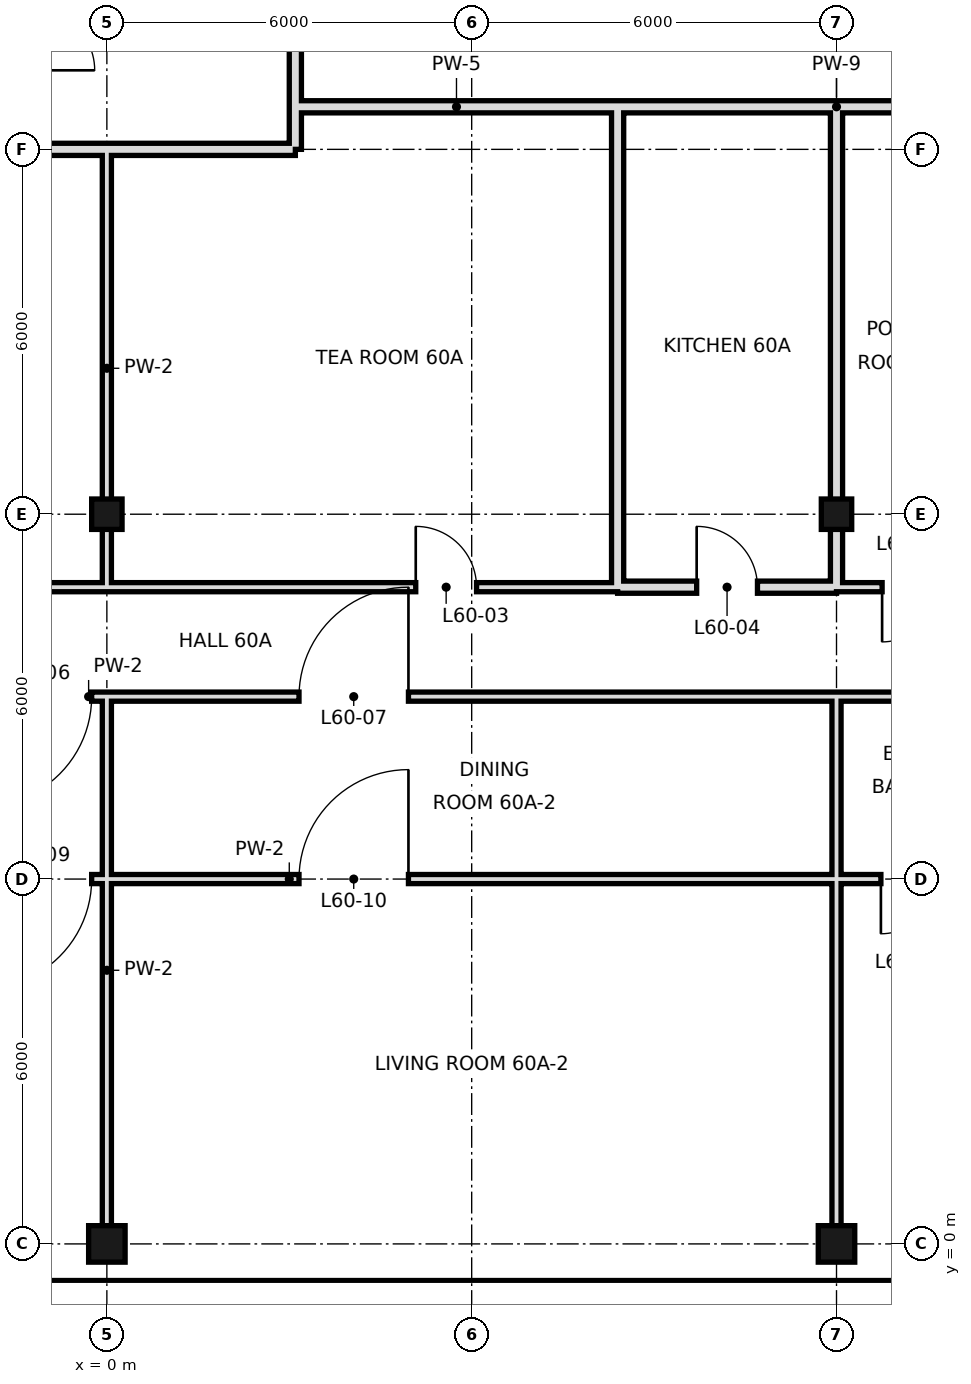
"""IFC4 building model, lengths in metres.
Left out: names, types, materials, properties, quantities, classifications, styles, units other than length and angle.
Written with IfcOpenShell. Run it as: python <this file> out.ifc"""

import sys

from ifc_helpers import new_model, si_unit, direction, frame, frame_2d, origin, origin_with_axes, origin_2d, place, context, subcontext, project, spatial, rectangle, hollow_rectangle, extrude, element, fill, save


model = new_model("IFC4")
c1 = context("Model", 3, precision=1e-05, world=origin(), true_north=direction((0.0, 1.0)))
c2 = subcontext(c1, "Body", "Model", "MODEL_VIEW")
j1 = project(units=[si_unit("LENGTHUNIT", "METRE"), si_unit("PLANEANGLEUNIT", "RADIAN")], contexts=[c1])
p1 = place(None, origin())
s1 = spatial("IfcSite", under=j1, at=p1, CompositionType="ELEMENT")
p2 = place(p1, origin())
s2 = spatial("IfcBuilding", under=s1, at=p2, CompositionType="ELEMENT")
p3 = place(p2, frame((0.0, 0.0, 254.0)))
s3 = spatial("IfcBuildingStorey", under=s2, at=p3, CompositionType="ELEMENT", Elevation=254.0)
p4 = place(p3, origin_with_axes())
e1 = element("IfcColumn", 1, at=p4, inside=s3, PredefinedType="COLUMN", context=c2, shape_type="SweptSolid", body=[
    extrude(hollow_rectangle(XDim=0.6, YDim=0.6, WallThickness=0.028, at=origin_2d()), origin(), (0.0, 0.0, 1.0), 3.6),
])
p5 = place(p3, frame((0.0, 12.0, 0.0), z_axis=(0.0, 0.0, 1.0), x_axis=(1.0, 0.0, 0.0)))
e2 = element("IfcColumn", 2, at=p5, inside=s3, PredefinedType="COLUMN", context=c2, shape_type="SweptSolid", body=[
    extrude(hollow_rectangle(XDim=0.5, YDim=0.5, WallThickness=0.025, at=origin_2d()), origin(), (0.0, 0.0, 1.0), 3.6),
])
p6 = place(p3, frame((12.0, 0.0, 0.0), z_axis=(0.0, 0.0, 1.0), x_axis=(1.0, 0.0, 0.0)))
e3 = element("IfcColumn", 3, at=p6, inside=s3, PredefinedType="COLUMN", context=c2, shape_type="SweptSolid", body=[
    extrude(hollow_rectangle(XDim=0.6, YDim=0.6, WallThickness=0.028, at=origin_2d()), origin(), (0.0, 0.0, 1.0), 3.6),
])
p7 = place(p3, frame((12.0, 12.0, 0.0), z_axis=(0.0, 0.0, 1.0), x_axis=(1.0, 0.0, 0.0)))
e4 = element("IfcColumn", 4, at=p7, inside=s3, PredefinedType="COLUMN", context=c2, shape_type="SweptSolid", body=[
    extrude(hollow_rectangle(XDim=0.5, YDim=0.5, WallThickness=0.025, at=origin_2d()), origin(), (0.0, 0.0, 1.0), 3.6),
])
p8 = place(p3, frame((0.0, 0.0, 0.0), z_axis=(0.0, 0.0, 1.0), x_axis=(0.0, 1.0, 0.0)))
e5 = element("IfcWall", 5, at=p8, inside=s3, PredefinedType="PARTITIONING", context=c2, shape_type="SweptSolid", body=[
    extrude(rectangle(XDim=9.0, YDim=0.15, at=frame_2d((4.5, 0.0))), origin(), (0.0, 0.0, 1.0), 2.68),
])
p9 = place(p3, frame((0.0, 10.8, 0.0), z_axis=(0.0, 0.0, 1.0), x_axis=(0.0, 1.0, 0.0)))
e6 = element("IfcWall", 6, at=p9, inside=s3, PredefinedType="PARTITIONING", context=c2, shape_type="SweptSolid", body=[
    extrude(rectangle(XDim=7.2, YDim=0.15, at=frame_2d((3.6, 0.0))), origin(), (0.0, 0.0, 1.0), 2.68),
])
p10 = place(p3, frame((12.0, 10.8, 0.0), z_axis=(0.0, 0.0, 1.0), x_axis=(0.0, 1.0, 0.0)))
e7 = element("IfcWall", 7, at=p10, inside=s3, PredefinedType="SOLIDWALL", context=c2, shape_type="SweptSolid", body=[
    extrude(rectangle(XDim=7.9, YDim=0.2, at=frame_2d((3.95, 0.0))), origin(), (0.0, 0.0, 1.0), 2.68),
])
p11 = place(p3, frame((12.0, 0.0, 0.0), z_axis=(0.0, 0.0, 1.0), x_axis=(0.0, 1.0, 0.0)))
e8 = element("IfcWall", 8, at=p11, inside=s3, PredefinedType="PARTITIONING", context=c2, shape_type="SweptSolid", body=[
    extrude(rectangle(XDim=6.0, YDim=0.15, at=frame_2d((3.0, 0.0))), origin(), (0.0, 0.0, 1.0), 2.68),
])
p12 = place(p3, frame((12.0, 6.0, 0.0), z_axis=(0.0, 0.0, 1.0), x_axis=(0.0, 1.0, 0.0)))
e9 = element("IfcWall", 9, at=p12, inside=s3, PredefinedType="PARTITIONING", context=c2, shape_type="SweptSolid", body=[
    extrude(rectangle(XDim=3.0, YDim=0.15, at=frame_2d((1.5, 0.0))), origin(), (0.0, 0.0, 1.0), 2.68),
])
p13 = place(p3, frame((3.1, 18.0, 0.0), z_axis=(0.0, 0.0, 1.0), x_axis=(0.0, 1.0, 0.0)))
e10 = element("IfcWall", 10, at=p13, inside=s3, PredefinedType="SOLIDWALL", context=c2, shape_type="SweptSolid", body=[
    extrude(rectangle(XDim=3.6, YDim=0.2, at=frame_2d((1.8, 0.0))), origin(), (0.0, 0.0, 1.0), 2.93),
])
p14 = place(p3, frame((8.4, 10.8, 0.0), z_axis=(0.0, 0.0, 1.0), x_axis=(0.0, 1.0, 0.0)))
e11 = element("IfcWall", 11, at=p14, inside=s3, PredefinedType="SOLIDWALL", context=c2, shape_type="SweptSolid", body=[
    extrude(rectangle(XDim=7.9, YDim=0.2, at=frame_2d((3.95, 0.0))), origin(), (0.0, 0.0, 1.0), 2.68),
])
p15 = place(p3, frame((8.4, 10.8, 0.0), z_axis=(0.0, 0.0, 1.0), x_axis=(1.0, 0.0, 0.0)))
e12 = element("IfcWall", 12, at=p15, inside=s3, PredefinedType="SOLIDWALL", context=c2, shape_type="SweptSolid", body=[
    extrude(rectangle(XDim=3.6, YDim=0.2, at=frame_2d((1.8, 0.0))), origin(), (0.0, 0.0, 1.0), 2.68),
])
p16 = place(p15, frame((1.3, 0.0, 0.0)))
e13 = element("IfcOpeningElement", 13, at=p16, cuts=e12, PredefinedType="OPENING", context=c2, shape_type="SweptSolid", body=[
    extrude(rectangle(XDim=1.0, YDim=2.4, at=frame_2d((0.5, 1.2))), frame((0.0, 0.11, 0.0), z_axis=(0.0, -1.0, 0.0), x_axis=(1.0, 0.0, 0.0)), (0.0, 0.0, 1.0), 0.22),
])
p17 = place(p3, frame((-12.6, 10.8, 0.0), z_axis=(0.0, 0.0, 1.0), x_axis=(1.0, 0.0, 0.0)))
e14 = element("IfcWall", 14, at=p17, inside=s3, PredefinedType="PARTITIONING", context=c2, shape_type="SweptSolid", body=[
    extrude(rectangle(XDim=21.0, YDim=0.15, at=frame_2d((10.5, 0.0))), origin(), (0.0, 0.0, 1.0), 3.38),
])
p18 = place(p17, frame((10.3, 0.0, 0.0)))
e15 = element("IfcOpeningElement", 15, at=p18, cuts=e14, PredefinedType="OPENING", context=c2, shape_type="SweptSolid", body=[
    extrude(rectangle(XDim=1.0, YDim=2.4, at=frame_2d((0.5, 1.2))), frame((0.0, 0.085, 0.0), z_axis=(0.0, -1.0, 0.0), x_axis=(1.0, 0.0, 0.0)), (0.0, 0.0, 1.0), 0.17),
])
p19 = place(p17, frame((17.68, 0.0, 0.0)))
e16 = element("IfcOpeningElement", 16, at=p19, cuts=e14, PredefinedType="OPENING", context=c2, shape_type="SweptSolid", body=[
    extrude(rectangle(XDim=1.0, YDim=2.4, at=frame_2d((0.5, 1.2))), frame((0.0, 0.085, 0.0), z_axis=(0.0, -1.0, 0.0), x_axis=(1.0, 0.0, 0.0)), (0.0, 0.0, 1.0), 0.17),
])
p20 = place(p3, frame((12.0, 10.8, 0.0), z_axis=(0.0, 0.0, 1.0), x_axis=(1.0, 0.0, 0.0)))
e17 = element("IfcWall", 17, at=p20, inside=s3, PredefinedType="PARTITIONING", context=c2, shape_type="SweptSolid", body=[
    extrude(rectangle(XDim=2.4, YDim=0.15, at=frame_2d((1.2, 0.0))), origin(), (0.0, 0.0, 1.0), 3.38),
])
p21 = place(p20, frame((0.75, 0.0, 0.0)))
e18 = element("IfcOpeningElement", 18, at=p21, cuts=e17, PredefinedType="OPENING", context=c2, shape_type="SweptSolid", body=[
    extrude(rectangle(XDim=0.9, YDim=2.4, at=frame_2d((0.45, 1.2))), frame((0.0, 0.085, 0.0), z_axis=(0.0, -1.0, 0.0), x_axis=(1.0, 0.0, 0.0)), (0.0, 0.0, 1.0), 0.17),
])
p22 = place(p3, frame((-1.2, 18.0, 0.0), z_axis=(0.0, 0.0, 1.0), x_axis=(1.0, 0.0, 0.0)))
e19 = element("IfcWall", 19, at=p22, inside=s3, PredefinedType="SOLIDWALL", context=c2, shape_type="SweptSolid", body=[
    extrude(rectangle(XDim=4.3, YDim=0.2, at=frame_2d((2.15, 0.0))), origin(), (0.0, 0.0, 1.0), 2.68),
])
p23 = place(p3, frame((3.1, 18.7, 0.0), z_axis=(0.0, 0.0, 1.0), x_axis=(1.0, 0.0, 0.0)))
e20 = element("IfcWall", 20, at=p23, inside=s3, PredefinedType="SOLIDWALL", context=c2, shape_type="SweptSolid", body=[
    extrude(rectangle(XDim=5.3, YDim=0.2, at=frame_2d((2.65, 0.0))), origin(), (0.0, 0.0, 1.0), 2.68),
])
p24 = place(p3, frame((12.0, 18.7, 0.0), z_axis=(0.0, 0.0, 1.0), x_axis=(1.0, 0.0, 0.0)))
e21 = element("IfcWall", 21, at=p24, inside=s3, PredefinedType="SOLIDWALL", context=c2, shape_type="SweptSolid", body=[
    extrude(rectangle(XDim=6.0, YDim=0.2, at=frame_2d((3.0, 0.0))), origin(), (0.0, 0.0, 1.0), 2.68),
])
p25 = place(p24, frame((3.22, 0.0, 0.0)))
e22 = element("IfcOpeningElement", 22, at=p25, cuts=e21, PredefinedType="OPENING", context=c2, shape_type="SweptSolid", body=[
    extrude(rectangle(XDim=1.2, YDim=2.4, at=frame_2d((0.6, 1.2))), frame((0.0, 0.11, 0.0), z_axis=(0.0, -1.0, 0.0), x_axis=(1.0, 0.0, 0.0)), (0.0, 0.0, 1.0), 0.22),
])
p26 = place(p3, frame((8.4, 18.7, 0.0), z_axis=(0.0, 0.0, 1.0), x_axis=(1.0, 0.0, 0.0)))
e23 = element("IfcWall", 23, at=p26, inside=s3, PredefinedType="SOLIDWALL", context=c2, shape_type="SweptSolid", body=[
    extrude(rectangle(XDim=3.6, YDim=0.2, at=frame_2d((1.8, 0.0))), origin(), (0.0, 0.0, 1.0), 3.38),
])
p27 = place(p3, frame((-12.0, 6.0, 0.0), z_axis=(0.0, 0.0, 1.0), x_axis=(1.0, 0.0, 0.0)))
e24 = element("IfcWall", 24, at=p27, inside=s3, PredefinedType="PARTITIONING", context=c2, shape_type="SweptSolid", body=[
    extrude(rectangle(XDim=24.0, YDim=0.15, at=frame_2d((12.0, 0.0))), origin(), (0.0, 0.0, 1.0), 2.68),
])
p28 = place(p27, frame((9.95, 0.0, 0.0)))
e25 = element("IfcOpeningElement", 25, at=p28, cuts=e24, PredefinedType="OPENING", context=c2, shape_type="SweptSolid", body=[
    extrude(rectangle(XDim=1.8, YDim=2.4, at=frame_2d((0.9, 1.2))), frame((0.0, 0.085, 0.0), z_axis=(0.0, -1.0, 0.0), x_axis=(1.0, 0.0, 0.0)), (0.0, 0.0, 1.0), 0.17),
])
p29 = place(p27, frame((15.16, 0.0, 0.0)))
e26 = element("IfcOpeningElement", 26, at=p29, cuts=e24, PredefinedType="OPENING", context=c2, shape_type="SweptSolid", body=[
    extrude(rectangle(XDim=1.8, YDim=2.4, at=frame_2d((0.9, 1.2))), frame((0.0, 0.085, 0.0), z_axis=(0.0, -1.0, 0.0), x_axis=(1.0, 0.0, 0.0)), (0.0, 0.0, 1.0), 0.17),
])
p30 = place(p3, frame((12.0, 6.0, 0.0), z_axis=(0.0, 0.0, 1.0), x_axis=(1.0, 0.0, 0.0)))
e27 = element("IfcWall", 27, at=p30, inside=s3, PredefinedType="PARTITIONING", context=c2, shape_type="SweptSolid", body=[
    extrude(rectangle(XDim=3.0, YDim=0.15, at=frame_2d((1.5, 0.0))), origin(), (0.0, 0.0, 1.0), 2.93),
])
p31 = place(p30, frame((0.73, 0.0, 0.0)))
e28 = element("IfcOpeningElement", 28, at=p31, cuts=e27, PredefinedType="OPENING", context=c2, shape_type="SweptSolid", body=[
    extrude(rectangle(XDim=0.9, YDim=2.4, at=frame_2d((0.45, 1.2))), frame((0.0, 0.085, 0.0), z_axis=(0.0, -1.0, 0.0), x_axis=(1.0, 0.0, 0.0)), (0.0, 0.0, 1.0), 0.17),
])
p32 = place(p3, frame((-12.6, 9.0, 0.0), z_axis=(0.0, 0.0, 1.0), x_axis=(1.0, 0.0, 0.0)))
e29 = element("IfcWall", 29, at=p32, inside=s3, PredefinedType="PARTITIONING", context=c2, shape_type="SweptSolid", body=[
    extrude(rectangle(XDim=24.6, YDim=0.15, at=frame_2d((12.3, 0.0))), origin(), (0.0, 0.0, 1.0), 3.38),
])
p33 = place(p32, frame((10.55, 0.0, 0.0)))
e30 = element("IfcOpeningElement", 30, at=p33, cuts=e29, PredefinedType="OPENING", context=c2, shape_type="SweptSolid", body=[
    extrude(rectangle(XDim=1.8, YDim=2.4, at=frame_2d((0.9, 1.2))), frame((0.0, 0.085, 0.0), z_axis=(0.0, -1.0, 0.0), x_axis=(1.0, 0.0, 0.0)), (0.0, 0.0, 1.0), 0.17),
])
p34 = place(p32, frame((15.76, 0.0, 0.0)))
e31 = element("IfcOpeningElement", 31, at=p34, cuts=e29, PredefinedType="OPENING", context=c2, shape_type="SweptSolid", body=[
    extrude(rectangle(XDim=1.8, YDim=2.4, at=frame_2d((0.9, 1.2))), frame((0.0, 0.085, 0.0), z_axis=(0.0, -1.0, 0.0), x_axis=(1.0, 0.0, 0.0)), (0.0, 0.0, 1.0), 0.17),
])
p35 = place(p3, frame((12.0, 9.0, 0.0), z_axis=(0.0, 0.0, 1.0), x_axis=(1.0, 0.0, 0.0)))
e32 = element("IfcWall", 32, at=p35, inside=s3, PredefinedType="PARTITIONING", context=c2, shape_type="SweptSolid", body=[
    extrude(rectangle(XDim=3.0, YDim=0.15, at=frame_2d((1.5, 0.0))), origin(), (0.0, 0.0, 1.0), 3.38),
])
p36 = place(p19, origin())
e33 = element("IfcDoor", 33, at=p36, inside=s3, OperationType="SINGLE_SWING_LEFT", PredefinedType="DOOR", context=c2, shape_type="SweptSolid", body=[
    extrude(rectangle(XDim=1.0, YDim=2.4, at=frame_2d((0.5, 1.2))), frame((0.0, 0.025, 0.0), z_axis=(0.0, -1.0, 0.0), x_axis=(1.0, 0.0, 0.0)), (0.0, 0.0, 1.0), 0.05),
])
fill(e16, e33)
p37 = place(p16, origin())
e34 = element("IfcDoor", 34, at=p37, inside=s3, OperationType="SINGLE_SWING_LEFT", PredefinedType="DOOR", context=c2, shape_type="SweptSolid", body=[
    extrude(rectangle(XDim=1.0, YDim=2.4, at=frame_2d((0.5, 1.2))), frame((0.0, 0.025, 0.0), z_axis=(0.0, -1.0, 0.0), x_axis=(1.0, 0.0, 0.0)), (0.0, 0.0, 1.0), 0.05),
])
fill(e13, e34)
p38 = place(p21, frame((0.9, 0.0, 0.0), z_axis=(0.0, 0.0, 1.0), x_axis=(-1.0, 0.0, 0.0)))
e35 = element("IfcDoor", 35, at=p38, inside=s3, OperationType="SINGLE_SWING_RIGHT", PredefinedType="DOOR", context=c2, shape_type="SweptSolid", body=[
    extrude(rectangle(XDim=0.9, YDim=2.4, at=frame_2d((0.45, 1.2))), frame((0.0, 0.025, 0.0), z_axis=(0.0, -1.0, 0.0), x_axis=(1.0, 0.0, 0.0)), (0.0, 0.0, 1.0), 0.05),
])
fill(e18, e35)
p39 = place(p33, frame((1.8, 0.0, 0.0), z_axis=(0.0, 0.0, 1.0), x_axis=(-1.0, 0.0, 0.0)))
e36 = element("IfcDoor", 36, at=p39, inside=s3, OperationType="SINGLE_SWING_RIGHT", PredefinedType="DOOR", context=c2, shape_type="SweptSolid", body=[
    extrude(rectangle(XDim=1.8, YDim=2.4, at=frame_2d((0.9, 1.2))), frame((0.0, 0.025, 0.0), z_axis=(0.0, -1.0, 0.0), x_axis=(1.0, 0.0, 0.0)), (0.0, 0.0, 1.0), 0.05),
])
fill(e30, e36)
p40 = place(p34, frame((1.8, 0.0, 0.0), z_axis=(0.0, 0.0, 1.0), x_axis=(-1.0, 0.0, 0.0)))
e37 = element("IfcDoor", 37, at=p40, inside=s3, OperationType="SINGLE_SWING_LEFT", PredefinedType="DOOR", context=c2, shape_type="SweptSolid", body=[
    extrude(rectangle(XDim=1.8, YDim=2.4, at=frame_2d((0.9, 1.2))), frame((0.0, 0.025, 0.0), z_axis=(0.0, -1.0, 0.0), x_axis=(1.0, 0.0, 0.0)), (0.0, 0.0, 1.0), 0.05),
])
fill(e31, e37)
p41 = place(p28, frame((1.8, 0.0, 0.0), z_axis=(0.0, 0.0, 1.0), x_axis=(-1.0, 0.0, 0.0)))
e38 = element("IfcDoor", 38, at=p41, inside=s3, OperationType="SINGLE_SWING_RIGHT", PredefinedType="DOOR", context=c2, shape_type="SweptSolid", body=[
    extrude(rectangle(XDim=1.8, YDim=2.4, at=frame_2d((0.9, 1.2))), frame((0.0, 0.025, 0.0), z_axis=(0.0, -1.0, 0.0), x_axis=(1.0, 0.0, 0.0)), (0.0, 0.0, 1.0), 0.05),
])
fill(e25, e38)
p42 = place(p29, frame((1.8, 0.0, 0.0), z_axis=(0.0, 0.0, 1.0), x_axis=(-1.0, 0.0, 0.0)))
e39 = element("IfcDoor", 39, at=p42, inside=s3, OperationType="SINGLE_SWING_LEFT", PredefinedType="DOOR", context=c2, shape_type="SweptSolid", body=[
    extrude(rectangle(XDim=1.8, YDim=2.4, at=frame_2d((0.9, 1.2))), frame((0.0, 0.025, 0.0), z_axis=(0.0, -1.0, 0.0), x_axis=(1.0, 0.0, 0.0)), (0.0, 0.0, 1.0), 0.05),
])
fill(e26, e39)
p43 = place(p31, frame((0.9, 0.0, 0.0), z_axis=(0.0, 0.0, 1.0), x_axis=(-1.0, 0.0, 0.0)))
e40 = element("IfcDoor", 40, at=p43, inside=s3, OperationType="SINGLE_SWING_RIGHT", PredefinedType="DOOR", context=c2, shape_type="SweptSolid", body=[
    extrude(rectangle(XDim=0.9, YDim=2.4, at=frame_2d((0.45, 1.2))), frame((0.0, 0.025, 0.0), z_axis=(0.0, -1.0, 0.0), x_axis=(1.0, 0.0, 0.0)), (0.0, 0.0, 1.0), 0.05),
])
fill(e28, e40)
save(model, sys.argv[1])
